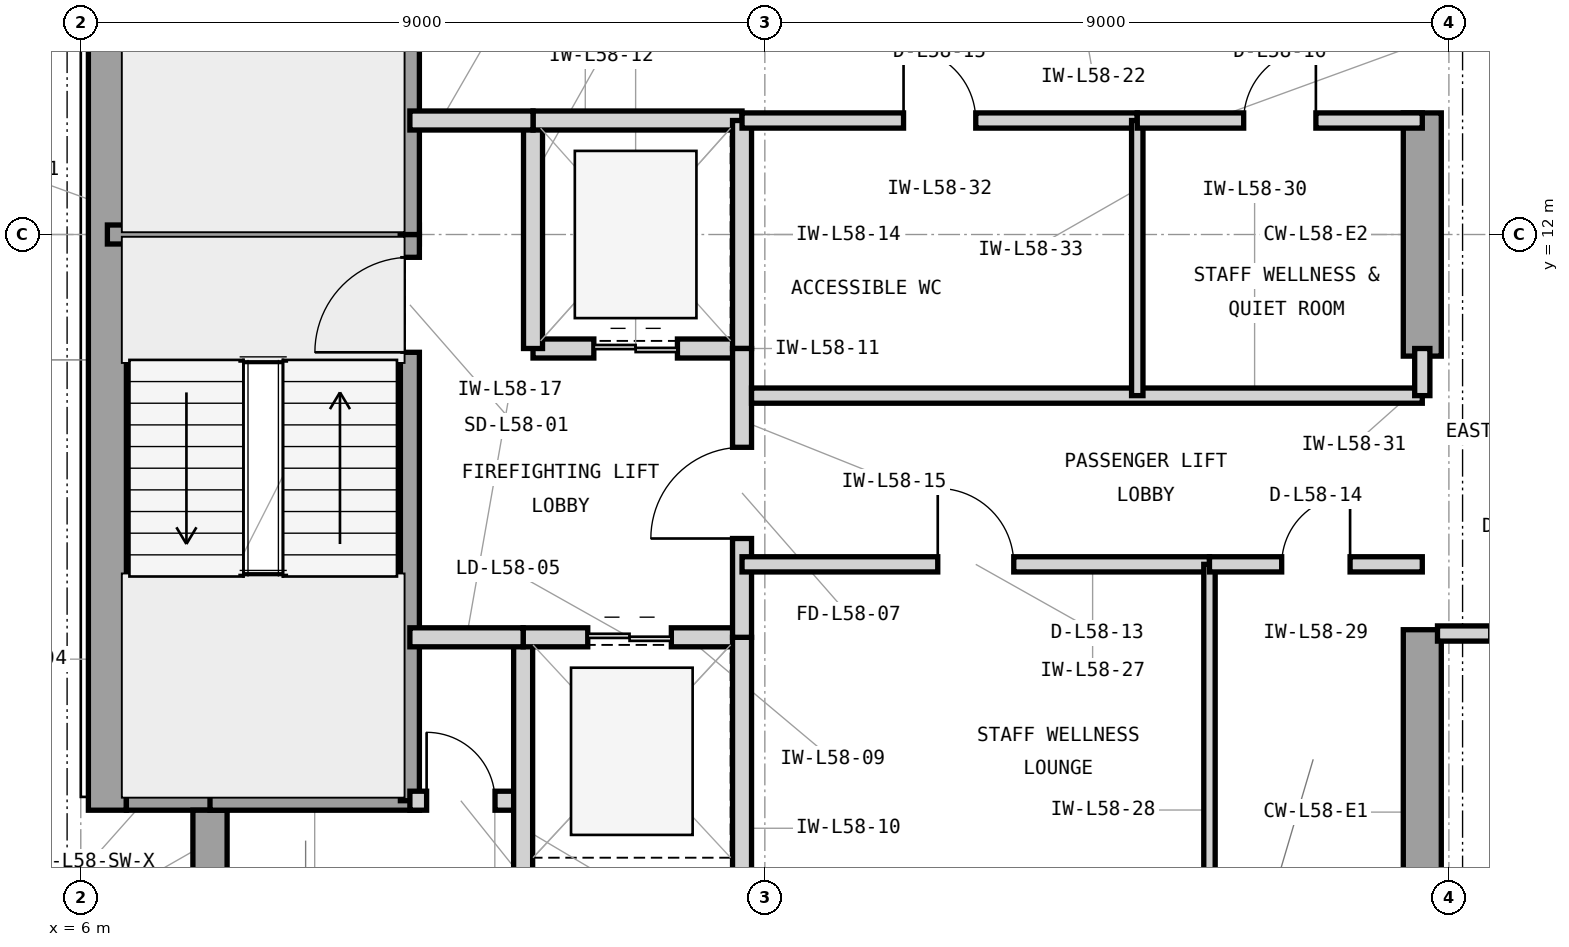
"""IFC4 building model, lengths in metres.
Left out: names, types, materials, properties, quantities, classifications, styles, units other than length and angle.
Written with IfcOpenShell. Run it as: python <this file> out.ifc"""

import sys

from ifc_helpers import new_model, si_unit, direction, frame, frame_2d, origin, place, context, subcontext, project, spatial, rectangle, extrude, element, fill, save


model = new_model("IFC4")
c1 = context("Model", 3, precision=1e-05, world=origin(), true_north=direction((0.0, 1.0)))
c2 = subcontext(c1, "Body", "Model", "MODEL_VIEW")
j1 = project(units=[si_unit("LENGTHUNIT", "METRE"), si_unit("PLANEANGLEUNIT", "RADIAN")], contexts=[c1])
p1 = place(None, origin())
s1 = spatial("IfcSite", under=j1, at=p1, CompositionType="ELEMENT")
p2 = place(p1, origin())
s2 = spatial("IfcBuilding", under=s1, at=p2, CompositionType="ELEMENT")
p3 = place(p2, frame((0.0, 0.0, 239.1)))
s3 = spatial("IfcBuildingStorey", under=s2, at=p3, CompositionType="ELEMENT", Elevation=239.1)
p4 = place(p3, frame((6.35, 4.425, 0.0), z_axis=(0.0, 0.0, 1.0), x_axis=(0.0, 1.0, 0.0)))
e1 = element("IfcWall", 1, at=p4, inside=s3, PredefinedType="SHEAR", context=c2, shape_type="SweptSolid", body=[
    extrude(rectangle(XDim=15.15, YDim=0.5, at=frame_2d((7.575, 0.0))), origin(), (0.0, 0.0, 1.0), 3.9),
])
p5 = place(p3, frame((23.65, 3.6, 0.0), z_axis=(0.0, 0.0, 1.0), x_axis=(0.0, 1.0, 0.0)))
e2 = element("IfcWall", 2, at=p5, inside=s3, PredefinedType="SHEAR", context=c2, shape_type="SweptSolid", body=[
    extrude(rectangle(XDim=3.2, YDim=0.5, at=frame_2d((1.6, 0.0))), origin(), (0.0, 0.0, 1.0), 3.9),
])
p6 = place(p3, frame((23.65, 10.4, 0.0), z_axis=(0.0, 0.0, 1.0), x_axis=(0.0, 1.0, 0.0)))
e3 = element("IfcWall", 3, at=p6, inside=s3, PredefinedType="SHEAR", context=c2, shape_type="SweptSolid", body=[
    extrude(rectangle(XDim=3.2, YDim=0.5, at=frame_2d((1.6, 0.0))), origin(), (0.0, 0.0, 1.0), 3.9),
])
p7 = place(p3, frame((6.6, 4.65, 0.0), z_axis=(0.0, 0.0, 1.0), x_axis=(1.0, 0.0, 0.0)))
e4 = element("IfcWall", 4, at=p7, inside=s3, PredefinedType="SHEAR", context=c2, shape_type="SweptSolid", body=[
    extrude(rectangle(XDim=1.325, YDim=0.45, at=frame_2d((0.663, 0.0))), origin(), (0.0, 0.0, 1.0), 3.9),
])
p8 = place(p3, frame((7.7, 3.6, 0.0), z_axis=(0.0, 0.0, 1.0), x_axis=(0.0, 1.0, 0.0)))
e5 = element("IfcWall", 5, at=p8, inside=s3, PredefinedType="SHEAR", context=c2, shape_type="SweptSolid", body=[
    extrude(rectangle(XDim=0.825, YDim=0.45, at=frame_2d((0.413, 0.0))), origin(), (0.0, 0.0, 1.0), 3.9),
])
p9 = place(p3, frame((6.35, 12.0, 0.0), z_axis=(0.0, 0.0, 1.0), x_axis=(1.0, 0.0, 0.0)))
e6 = element("IfcWall", 6, at=p9, inside=s3, PredefinedType="SHEAR", context=c2, shape_type="SweptSolid", body=[
    extrude(rectangle(XDim=4.105, YDim=0.25, at=frame_2d((2.052, 0.0))), origin(), (0.0, 0.0, 1.0), 3.9),
])
p10 = place(p3, frame((7.7, 4.55, 0.0), z_axis=(0.0, 0.0, 1.0), x_axis=(1.0, 0.0, 0.0)))
e7 = element("IfcWall", 7, at=p10, inside=s3, PredefinedType="SHEAR", context=c2, shape_type="SweptSolid", body=[
    extrude(rectangle(XDim=2.755, YDim=0.25, at=frame_2d((1.377, 0.0))), origin(), (0.0, 0.0, 1.0), 3.9),
])
p11 = place(p3, frame((10.33, 4.55, 0.0), z_axis=(0.0, 0.0, 1.0), x_axis=(0.0, 1.0, 0.0)))
e8 = element("IfcWall", 8, at=p11, inside=s3, PredefinedType="SHEAR", context=c2, shape_type="SweptSolid", body=[
    extrude(rectangle(XDim=7.45, YDim=0.25, at=frame_2d((3.725, 0.0))), origin(), (0.0, 0.0, 1.0), 3.9),
])
p12 = place(p11, frame((5.9, 0.0, 0.0)))
e9 = element("IfcOpeningElement", 9, at=p12, cuts=e8, PredefinedType="OPENING", context=c2, shape_type="SweptSolid", body=[
    extrude(rectangle(XDim=1.25, YDim=2.2, at=frame_2d((0.625, 1.1))), frame((0.0, 0.135, 0.0), z_axis=(0.0, -1.0, 0.0), x_axis=(1.0, 0.0, 0.0)), (0.0, 0.0, 1.0), 0.27),
])
p13 = place(p3, frame((10.33, 12.0, 0.0), z_axis=(0.0, 0.0, 1.0), x_axis=(0.0, 1.0, 0.0)))
e10 = element("IfcWall", 10, at=p13, inside=s3, PredefinedType="SHEAR", context=c2, shape_type="SweptSolid", body=[
    extrude(rectangle(XDim=7.45, YDim=0.25, at=frame_2d((3.725, 0.0))), origin(), (0.0, 0.0, 1.0), 3.9),
])
p14 = place(p13, frame((5.85, 0.0, 0.0)))
e11 = element("IfcOpeningElement", 11, at=p14, cuts=e10, PredefinedType="OPENING", context=c2, shape_type="SweptSolid", body=[
    extrude(rectangle(XDim=1.25, YDim=2.2, at=frame_2d((0.625, 1.1))), frame((0.0, 0.135, 0.0), z_axis=(0.0, -1.0, 0.0), x_axis=(1.0, 0.0, 0.0)), (0.0, 0.0, 1.0), 0.27),
])
p15 = place(p3, frame((10.33, 4.55, 0.0), z_axis=(0.0, 0.0, 1.0), x_axis=(1.0, 0.0, 0.0)))
e12 = element("IfcWall", 12, at=p15, inside=s3, PredefinedType="PARTITIONING", context=c2, shape_type="SweptSolid", body=[
    extrude(rectangle(XDim=1.49, YDim=0.25, at=frame_2d((0.745, 0.0))), origin(), (0.0, 0.0, 1.0), 3.69),
])
p16 = place(p15, frame((0.22, 0.0, 0.0)))
e13 = element("IfcOpeningElement", 13, at=p16, cuts=e12, PredefinedType="OPENING", context=c2, shape_type="SweptSolid", body=[
    extrude(rectangle(XDim=0.9, YDim=2.1, at=frame_2d((0.45, 1.05))), frame((0.0, 0.135, 0.0), z_axis=(0.0, -1.0, 0.0), x_axis=(1.0, 0.0, 0.0)), (0.0, 0.0, 1.0), 0.27),
])
p17 = place(p3, frame((11.82, 3.35, 0.0), z_axis=(0.0, 0.0, 1.0), x_axis=(0.0, 1.0, 0.0)))
e14 = element("IfcWall", 14, at=p17, inside=s3, PredefinedType="PARTITIONING", context=c2, shape_type="SweptSolid", body=[
    extrude(rectangle(XDim=3.35, YDim=0.25, at=frame_2d((1.675, 0.0))), origin(), (0.0, 0.0, 1.0), 3.69),
])
p18 = place(p3, frame((11.82, 6.7, 0.0), z_axis=(0.0, 0.0, 1.0), x_axis=(1.0, 0.0, 0.0)))
e15 = element("IfcWall", 15, at=p18, inside=s3, PredefinedType="PARTITIONING", context=c2, shape_type="SweptSolid", body=[
    extrude(rectangle(XDim=2.88, YDim=0.25, at=frame_2d((1.44, 0.0))), origin(), (0.0, 0.0, 1.0), 3.073),
])
p19 = place(p18, frame((0.85, 0.0, 0.0)))
e16 = element("IfcOpeningElement", 16, at=p19, cuts=e15, PredefinedType="OPENING", context=c2, shape_type="SweptSolid", body=[
    extrude(rectangle(XDim=1.1, YDim=2.25, at=frame_2d((0.55, 1.125))), frame((0.0, 0.135, 0.0), z_axis=(0.0, -1.0, 0.0), x_axis=(1.0, 0.0, 0.0)), (0.0, 0.0, 1.0), 0.27),
])
p20 = place(p3, frame((14.7, 3.35, 0.0), z_axis=(0.0, 0.0, 1.0), x_axis=(0.0, 1.0, 0.0)))
e17 = element("IfcWall", 17, at=p20, inside=s3, PredefinedType="PARTITIONING", context=c2, shape_type="SweptSolid", body=[
    extrude(rectangle(XDim=3.35, YDim=0.25, at=frame_2d((1.675, 0.0))), origin(), (0.0, 0.0, 1.0), 3.69),
])
p21 = place(p3, frame((11.95, 10.5, 0.0), z_axis=(0.0, 0.0, 1.0), x_axis=(1.0, 0.0, 0.0)))
e18 = element("IfcWall", 18, at=p21, inside=s3, PredefinedType="PARTITIONING", context=c2, shape_type="SweptSolid", body=[
    extrude(rectangle(XDim=2.75, YDim=0.25, at=frame_2d((1.375, 0.0))), origin(), (0.0, 0.0, 1.0), 3.073),
])
p22 = place(p21, frame((0.8, 0.0, 0.0)))
e19 = element("IfcOpeningElement", 19, at=p22, cuts=e18, PredefinedType="OPENING", context=c2, shape_type="SweptSolid", body=[
    extrude(rectangle(XDim=1.1, YDim=2.25, at=frame_2d((0.55, 1.125))), frame((0.0, 0.135, 0.0), z_axis=(0.0, -1.0, 0.0), x_axis=(1.0, 0.0, 0.0)), (0.0, 0.0, 1.0), 0.27),
])
p23 = place(p3, frame((11.95, 10.5, 0.0), z_axis=(0.0, 0.0, 1.0), x_axis=(0.0, 1.0, 0.0)))
e20 = element("IfcWall", 20, at=p23, inside=s3, PredefinedType="PARTITIONING", context=c2, shape_type="SweptSolid", body=[
    extrude(rectangle(XDim=3.0, YDim=0.25, at=frame_2d((1.5, 0.0))), origin(), (0.0, 0.0, 1.0), 3.69),
])
p24 = place(p3, frame((11.95, 13.5, 0.0), z_axis=(0.0, 0.0, 1.0), x_axis=(1.0, 0.0, 0.0)))
e21 = element("IfcWall", 21, at=p24, inside=s3, PredefinedType="PARTITIONING", context=c2, shape_type="SweptSolid", body=[
    extrude(rectangle(XDim=2.75, YDim=0.25, at=frame_2d((1.375, 0.0))), origin(), (0.0, 0.0, 1.0), 3.073),
])
p25 = place(p3, frame((14.7, 10.5, 0.0), z_axis=(0.0, 0.0, 1.0), x_axis=(0.0, 1.0, 0.0)))
e22 = element("IfcWall", 22, at=p25, inside=s3, PredefinedType="PARTITIONING", context=c2, shape_type="SweptSolid", body=[
    extrude(rectangle(XDim=3.0, YDim=0.25, at=frame_2d((1.5, 0.0))), origin(), (0.0, 0.0, 1.0), 3.69),
])
p26 = place(p3, frame((14.7, 6.7, 0.0), z_axis=(0.0, 0.0, 1.0), x_axis=(0.0, 1.0, 0.0)))
e23 = element("IfcWall", 23, at=p26, inside=s3, PredefinedType="PARTITIONING", context=c2, shape_type="SweptSolid", body=[
    extrude(rectangle(XDim=3.8, YDim=0.25, at=frame_2d((1.9, 0.0))), origin(), (0.0, 0.0, 1.0), 3.69),
])
p27 = place(p26, frame((1.3, 0.0, 0.0)))
e24 = element("IfcOpeningElement", 24, at=p27, cuts=e23, PredefinedType="OPENING", context=c2, shape_type="SweptSolid", body=[
    extrude(rectangle(XDim=1.2, YDim=2.2, at=frame_2d((0.6, 1.1))), frame((0.0, 0.135, 0.0), z_axis=(0.0, -1.0, 0.0), x_axis=(1.0, 0.0, 0.0)), (0.0, 0.0, 1.0), 0.27),
])
p28 = place(p3, frame((10.33, 13.5, 0.0), z_axis=(0.0, 0.0, 1.0), x_axis=(1.0, 0.0, 0.0)))
e25 = element("IfcWall", 25, at=p28, inside=s3, PredefinedType="PARTITIONING", context=c2, shape_type="SweptSolid", body=[
    extrude(rectangle(XDim=1.62, YDim=0.25, at=frame_2d((0.81, 0.0))), origin(), (0.0, 0.0, 1.0), 3.073),
])
p29 = place(p3, frame((10.33, 6.7, 0.0), z_axis=(0.0, 0.0, 1.0), x_axis=(1.0, 0.0, 0.0)))
e26 = element("IfcWall", 26, at=p29, inside=s3, PredefinedType="PARTITIONING", context=c2, shape_type="SweptSolid", body=[
    extrude(rectangle(XDim=1.49, YDim=0.25, at=frame_2d((0.745, 0.0))), origin(), (0.0, 0.0, 1.0), 3.073),
])
p30 = place(p3, frame((14.7, 7.66, 0.0), z_axis=(0.0, 0.0, 1.0), x_axis=(1.0, 0.0, 0.0)))
e27 = element("IfcWall", 27, at=p30, inside=s3, PredefinedType="PARTITIONING", context=c2, shape_type="SweptSolid", body=[
    extrude(rectangle(XDim=6.15, YDim=0.2, at=frame_2d((3.075, 0.0))), origin(), (0.0, 0.0, 1.0), 3.69),
])
p31 = place(p30, frame((2.575, 0.0, 0.0)))
e28 = element("IfcOpeningElement", 28, at=p31, cuts=e27, PredefinedType="OPENING", context=c2, shape_type="SweptSolid", body=[
    extrude(rectangle(XDim=1.0, YDim=2.15, at=frame_2d((0.5, 1.075))), frame((0.0, 0.11, 0.0), z_axis=(0.0, -1.0, 0.0), x_axis=(1.0, 0.0, 0.0)), (0.0, 0.0, 1.0), 0.22),
])
p32 = place(p3, frame((20.85, 3.35, 0.0), z_axis=(0.0, 0.0, 1.0), x_axis=(0.0, 1.0, 0.0)))
e29 = element("IfcWall", 29, at=p32, inside=s3, PredefinedType="PARTITIONING", context=c2, shape_type="SweptSolid", body=[
    extrude(rectangle(XDim=4.31, YDim=0.15, at=frame_2d((2.155, 0.0))), origin(), (0.0, 0.0, 1.0), 3.69),
])
p33 = place(p3, frame((20.85, 7.66, 0.0), z_axis=(0.0, 0.0, 1.0), x_axis=(1.0, 0.0, 0.0)))
e30 = element("IfcWall", 30, at=p33, inside=s3, PredefinedType="PARTITIONING", context=c2, shape_type="SweptSolid", body=[
    extrude(rectangle(XDim=2.8, YDim=0.2, at=frame_2d((1.4, 0.0))), origin(), (0.0, 0.0, 1.0), 3.69),
])
p34 = place(p33, frame((0.95, 0.0, 0.0)))
e31 = element("IfcOpeningElement", 31, at=p34, cuts=e30, PredefinedType="OPENING", context=c2, shape_type="SweptSolid", body=[
    extrude(rectangle(XDim=0.9, YDim=2.1, at=frame_2d((0.45, 1.05))), frame((0.0, 0.11, 0.0), z_axis=(0.0, -1.0, 0.0), x_axis=(1.0, 0.0, 0.0)), (0.0, 0.0, 1.0), 0.22),
])
p35 = place(p3, frame((14.825, 9.88, 0.0), z_axis=(0.0, 0.0, 1.0), x_axis=(1.0, 0.0, 0.0)))
e32 = element("IfcWall", 32, at=p35, inside=s3, PredefinedType="PARTITIONING", context=c2, shape_type="SweptSolid", body=[
    extrude(rectangle(XDim=8.825, YDim=0.2, at=frame_2d((4.413, 0.0))), origin(), (0.0, 0.0, 1.0), 3.69),
])
p36 = place(p3, frame((23.65, 9.88, 0.0), z_axis=(0.0, 0.0, 1.0), x_axis=(0.0, 1.0, 0.0)))
e33 = element("IfcWall", 33, at=p36, inside=s3, PredefinedType="PARTITIONING", context=c2, shape_type="SweptSolid", body=[
    extrude(rectangle(XDim=0.62, YDim=0.2, at=frame_2d((0.31, 0.0))), origin(), (0.0, 0.0, 1.0), 3.69),
])
p37 = place(p3, frame((14.7, 13.5, 0.0), z_axis=(0.0, 0.0, 1.0), x_axis=(1.0, 0.0, 0.0)))
e34 = element("IfcWall", 34, at=p37, inside=s3, PredefinedType="PARTITIONING", context=c2, shape_type="SweptSolid", body=[
    extrude(rectangle(XDim=5.2, YDim=0.2, at=frame_2d((2.6, 0.0))), origin(), (0.0, 0.0, 1.0), 3.073),
])
p38 = place(p37, frame((2.125, 0.0, 0.0)))
e35 = element("IfcOpeningElement", 35, at=p38, cuts=e34, PredefinedType="OPENING", context=c2, shape_type="SweptSolid", body=[
    extrude(rectangle(XDim=0.95, YDim=2.1, at=frame_2d((0.475, 1.05))), frame((0.0, 0.11, 0.0), z_axis=(0.0, -1.0, 0.0), x_axis=(1.0, 0.0, 0.0)), (0.0, 0.0, 1.0), 0.22),
])
p39 = place(p3, frame((19.9, 9.88, 0.0), z_axis=(0.0, 0.0, 1.0), x_axis=(0.0, 1.0, 0.0)))
e36 = element("IfcWall", 36, at=p39, inside=s3, PredefinedType="PARTITIONING", context=c2, shape_type="SweptSolid", body=[
    extrude(rectangle(XDim=3.62, YDim=0.15, at=frame_2d((1.81, 0.0))), origin(), (0.0, 0.0, 1.0), 3.69),
])
p40 = place(p3, frame((19.9, 13.5, 0.0), z_axis=(0.0, 0.0, 1.0), x_axis=(1.0, 0.0, 0.0)))
e37 = element("IfcWall", 37, at=p40, inside=s3, PredefinedType="PARTITIONING", context=c2, shape_type="SweptSolid", body=[
    extrude(rectangle(XDim=3.75, YDim=0.2, at=frame_2d((1.875, 0.0))), origin(), (0.0, 0.0, 1.0), 3.073),
])
p41 = place(p40, frame((1.4, 0.0, 0.0)))
e38 = element("IfcOpeningElement", 38, at=p41, cuts=e37, PredefinedType="OPENING", context=c2, shape_type="SweptSolid", body=[
    extrude(rectangle(XDim=0.95, YDim=2.1, at=frame_2d((0.475, 1.05))), frame((0.0, 0.11, 0.0), z_axis=(0.0, -1.0, 0.0), x_axis=(1.0, 0.0, 0.0)), (0.0, 0.0, 1.0), 0.22),
])
p42 = place(p3, frame((23.85, 6.75, 0.0), z_axis=(0.0, 0.0, 1.0), x_axis=(1.0, 0.0, 0.0)))
e39 = element("IfcWall", 39, at=p42, inside=s3, PredefinedType="PARTITIONING", context=c2, shape_type="SweptSolid", body=[
    extrude(rectangle(XDim=2.85, YDim=0.2, at=frame_2d((1.425, 0.0))), origin(), (0.0, 0.0, 1.0), 3.69),
])
p43 = place(p42, frame((0.7, 0.0, 0.0)))
e40 = element("IfcOpeningElement", 40, at=p43, cuts=e39, PredefinedType="OPENING", context=c2, shape_type="SweptSolid", body=[
    extrude(rectangle(XDim=1.0, YDim=2.15, at=frame_2d((0.5, 1.075))), frame((0.0, 0.11, 0.0), z_axis=(0.0, -1.0, 0.0), x_axis=(1.0, 0.0, 0.0)), (0.0, 0.0, 1.0), 0.22),
])
p44 = place(p12, origin())
e41 = element("IfcDoor", 41, at=p44, inside=s3, OperationType="SINGLE_SWING_LEFT", PredefinedType="DOOR", context=c2, shape_type="SweptSolid", body=[
    extrude(rectangle(XDim=1.25, YDim=2.2, at=frame_2d((0.625, 1.1))), frame((0.0, 0.025, 0.0), z_axis=(0.0, -1.0, 0.0), x_axis=(1.0, 0.0, 0.0)), (0.0, 0.0, 1.0), 0.05),
])
fill(e9, e41)
p45 = place(p16, origin())
e42 = element("IfcDoor", 42, at=p45, inside=s3, OperationType="SINGLE_SWING_LEFT", PredefinedType="TRAPDOOR", context=c2, shape_type="SweptSolid", body=[
    extrude(rectangle(XDim=0.9, YDim=2.1, at=frame_2d((0.45, 1.05))), frame((0.0, 0.025, 0.0), z_axis=(0.0, -1.0, 0.0), x_axis=(1.0, 0.0, 0.0)), (0.0, 0.0, 1.0), 0.05),
])
fill(e13, e42)
p46 = place(p19, origin())
e43 = element("IfcDoor", 43, at=p46, inside=s3, OperationType="DOUBLE_DOOR_SLIDING", PredefinedType="DOOR", context=c2, shape_type="SweptSolid", body=[
    extrude(rectangle(XDim=1.1, YDim=2.25, at=frame_2d((0.55, 1.125))), frame((0.0, 0.025, 0.0), z_axis=(0.0, -1.0, 0.0), x_axis=(1.0, 0.0, 0.0)), (0.0, 0.0, 1.0), 0.05),
])
fill(e16, e43)
p47 = place(p22, origin())
e44 = element("IfcDoor", 44, at=p47, inside=s3, OperationType="DOUBLE_DOOR_SLIDING", PredefinedType="DOOR", context=c2, shape_type="SweptSolid", body=[
    extrude(rectangle(XDim=1.1, YDim=2.25, at=frame_2d((0.55, 1.125))), frame((0.0, 0.025, 0.0), z_axis=(0.0, -1.0, 0.0), x_axis=(1.0, 0.0, 0.0)), (0.0, 0.0, 1.0), 0.05),
])
fill(e19, e44)
p48 = place(p27, origin())
e45 = element("IfcDoor", 45, at=p48, inside=s3, OperationType="SINGLE_SWING_LEFT", PredefinedType="DOOR", context=c2, shape_type="SweptSolid", body=[
    extrude(rectangle(XDim=1.2, YDim=2.2, at=frame_2d((0.6, 1.1))), frame((0.0, 0.025, 0.0), z_axis=(0.0, -1.0, 0.0), x_axis=(1.0, 0.0, 0.0)), (0.0, 0.0, 1.0), 0.05),
])
fill(e24, e45)
p49 = place(p31, origin())
e46 = element("IfcDoor", 46, at=p49, inside=s3, OperationType="SINGLE_SWING_LEFT", PredefinedType="DOOR", context=c2, shape_type="SweptSolid", body=[
    extrude(rectangle(XDim=1.0, YDim=2.15, at=frame_2d((0.5, 1.075))), frame((0.0, 0.025, 0.0), z_axis=(0.0, -1.0, 0.0), x_axis=(1.0, 0.0, 0.0)), (0.0, 0.0, 1.0), 0.05),
])
fill(e28, e46)
p50 = place(p34, origin())
e47 = element("IfcDoor", 47, at=p50, inside=s3, OperationType="SINGLE_SWING_RIGHT", PredefinedType="TRAPDOOR", context=c2, shape_type="SweptSolid", body=[
    extrude(rectangle(XDim=0.9, YDim=2.1, at=frame_2d((0.45, 1.05))), frame((0.0, 0.025, 0.0), z_axis=(0.0, -1.0, 0.0), x_axis=(1.0, 0.0, 0.0)), (0.0, 0.0, 1.0), 0.05),
])
fill(e31, e47)
p51 = place(p38, origin())
e48 = element("IfcDoor", 48, at=p51, inside=s3, OperationType="SINGLE_SWING_LEFT", PredefinedType="DOOR", context=c2, shape_type="SweptSolid", body=[
    extrude(rectangle(XDim=0.95, YDim=2.1, at=frame_2d((0.475, 1.05))), frame((0.0, 0.025, 0.0), z_axis=(0.0, -1.0, 0.0), x_axis=(1.0, 0.0, 0.0)), (0.0, 0.0, 1.0), 0.05),
])
fill(e35, e48)
p52 = place(p41, origin())
e49 = element("IfcDoor", 49, at=p52, inside=s3, OperationType="SINGLE_SWING_RIGHT", PredefinedType="DOOR", context=c2, shape_type="SweptSolid", body=[
    extrude(rectangle(XDim=0.95, YDim=2.1, at=frame_2d((0.475, 1.05))), frame((0.0, 0.025, 0.0), z_axis=(0.0, -1.0, 0.0), x_axis=(1.0, 0.0, 0.0)), (0.0, 0.0, 1.0), 0.05),
])
fill(e38, e49)
save(model, sys.argv[1])
